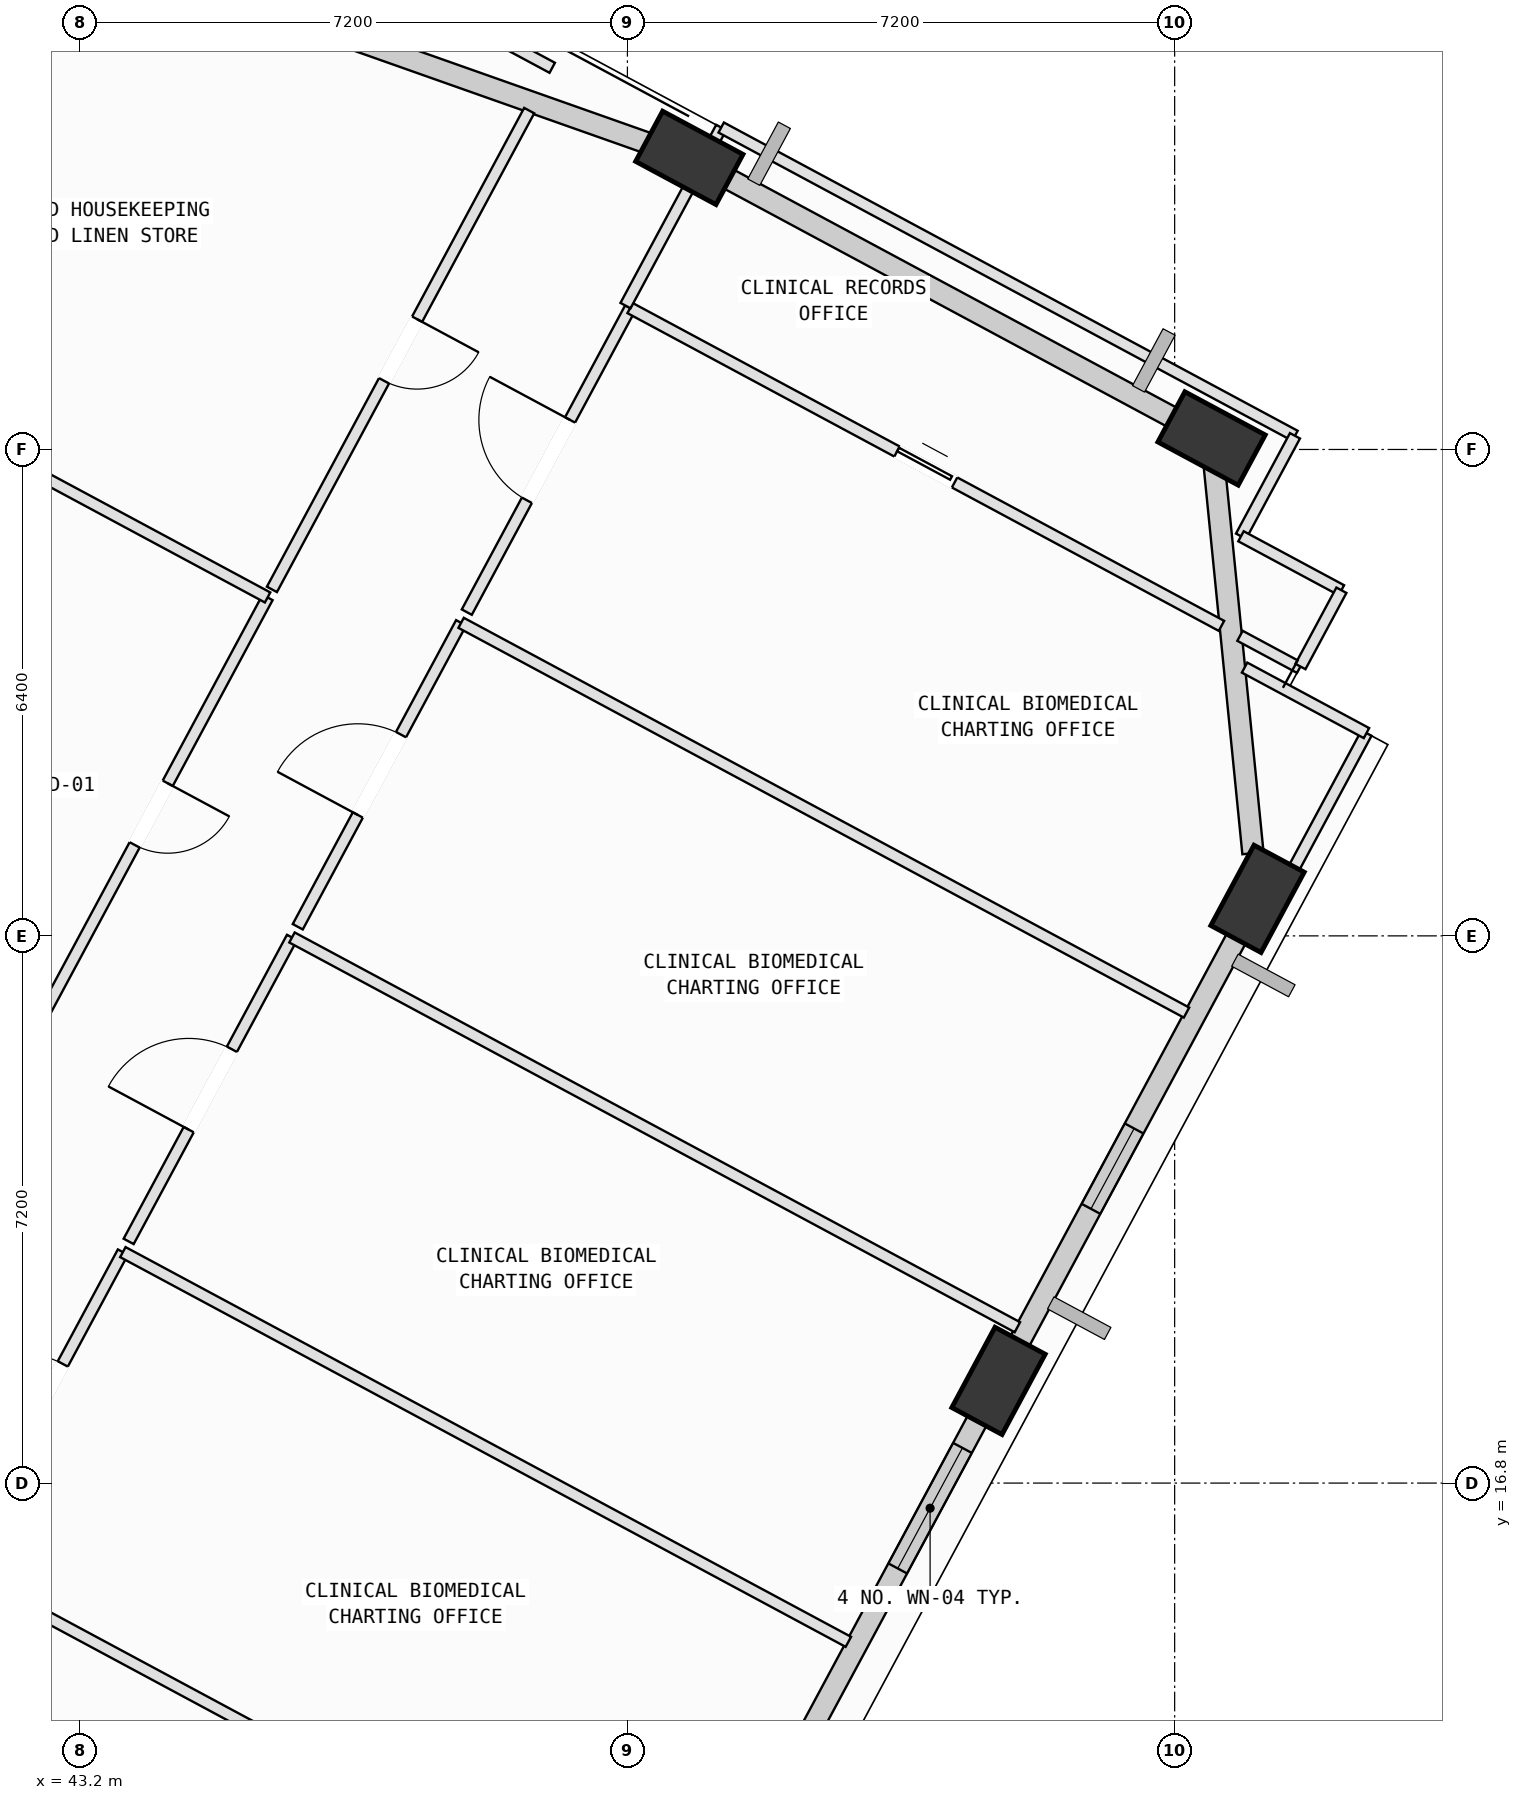
"""IFC4 building model, lengths in metres.
Left out: names, types, materials, properties, quantities, classifications, styles, units other than length and angle.
Written with IfcOpenShell. Run it as: python <this file> out.ifc"""

import sys

from ifc_helpers import new_model, si_unit, direction, frame, frame_2d, origin, origin_2d, place, context, subcontext, project, spatial, rectangle, extrude, element, fill, save


model = new_model("IFC4")
c1 = context("Model", 3, precision=1e-05, world=origin(), true_north=direction((0.0, 1.0)))
c2 = subcontext(c1, "Body", "Model", "MODEL_VIEW")
j1 = project(units=[si_unit("LENGTHUNIT", "METRE"), si_unit("PLANEANGLEUNIT", "RADIAN")], contexts=[c1])
p1 = place(None, origin())
s1 = spatial("IfcSite", under=j1, at=p1, CompositionType="ELEMENT")
p2 = place(p1, origin())
s2 = spatial("IfcBuilding", under=s1, at=p2, CompositionType="ELEMENT")
p3 = place(p2, frame((0.0, 0.0, 288.6)))
s3 = spatial("IfcBuildingStorey", under=s2, at=p3, CompositionType="ELEMENT", Elevation=288.6)
p4 = place(p3, frame((55.282, 18.145, 0.002), z_axis=(0.026701241209, 0.089713737548, 0.99560960673), x_axis=(-0.70383349377, -0.705563431999, 0.082453965787)))
e1 = element("IfcColumn", 1, at=p4, inside=s3, PredefinedType="COLUMN", context=c2, shape_type="SweptSolid", body=[
    extrude(rectangle(XDim=1.2, YDim=0.75, at=origin_2d()), origin(), (0.0, 0.0, 1.0), 4.014),
])
p5 = place(p3, frame((58.69, 24.487, 0.002), z_axis=(0.000425341829, 0.103479590753, 0.994631486221), x_axis=(-0.476917007508, -0.874208749099, 0.091154983125)))
e2 = element("IfcColumn", 2, at=p5, inside=s3, PredefinedType="COLUMN", context=c2, shape_type="SweptSolid", body=[
    extrude(rectangle(XDim=1.2, YDim=0.75, at=origin_2d()), origin(), (0.0, 0.0, 1.0), 4.018),
])
p6 = place(p3, frame((58.085, 30.545, 0.002), z_axis=(-0.024487034295, 0.100743183277, 0.994611077846), x_axis=(0.967157776152, -0.249394798072, 0.049072097195)))
e3 = element("IfcColumn", 3, at=p6, inside=s3, PredefinedType="COLUMN", context=c2, shape_type="SweptSolid", body=[
    extrude(rectangle(XDim=1.2, YDim=0.75, at=origin_2d()), origin(), (0.0, 0.0, 1.0), 4.018),
])
p7 = place(p3, frame((51.215, 34.237, 0.002), z_axis=(-0.039573663733, 0.072450245911, 0.996586617914), x_axis=(0.999201856166, 0.008297625984, 0.039074288691)))
e4 = element("IfcColumn", 4, at=p7, inside=s3, PredefinedType="COLUMN", context=c2, shape_type="SweptSolid", body=[
    extrude(rectangle(XDim=1.2, YDim=0.75, at=origin_2d()), origin(), (0.0, 0.0, 1.0), 4.01),
])
p8 = place(p3, frame((55.182, 17.958, 0.0), z_axis=(0.0, 0.0, 1.0), x_axis=(-0.47331339391, -0.880894108929, 0.0)))
e5 = element("IfcWall", 5, at=p8, inside=s3, PredefinedType="SOLIDWALL", context=c2, shape_type="SweptSolid", body=[
    extrude(rectangle(XDim=6.407, YDim=0.28, at=frame_2d((3.204, 0.0))), origin(), (0.0, 0.0, 1.0), 3.265),
])
p9 = place(p8, frame((0.79, 0.0, 0.75)))
e6 = element("IfcOpeningElement", 6, at=p9, cuts=e5, PredefinedType="OPENING", context=c2, shape_type="SweptSolid", body=[
    extrude(rectangle(XDim=1.8, YDim=2.05, at=frame_2d((0.9, 1.025))), frame((0.0, 0.15, 0.0), z_axis=(0.0, -1.0, 0.0), x_axis=(1.0, 0.0, 0.0)), (0.0, 0.0, 1.0), 0.3),
])
p10 = place(p3, frame((58.595, 24.309, 0.0), z_axis=(0.0, 0.0, 1.0), x_axis=(-0.47334203282, -0.88087872035, 0.0)))
e7 = element("IfcWall", 7, at=p10, inside=s3, PredefinedType="SOLIDWALL", context=c2, shape_type="SweptSolid", body=[
    extrude(rectangle(XDim=6.418, YDim=0.28, at=frame_2d((3.209, 0.0))), origin(), (0.0, 0.0, 1.0), 3.265),
])
p11 = place(p10, frame((3.228, 0.0, 0.75)))
e8 = element("IfcOpeningElement", 8, at=p11, cuts=e7, PredefinedType="OPENING", context=c2, shape_type="SweptSolid", body=[
    extrude(rectangle(XDim=1.2, YDim=1.75, at=frame_2d((0.6, 0.875))), frame((0.0, 0.15, 0.0), z_axis=(0.0, -1.0, 0.0), x_axis=(1.0, 0.0, 0.0)), (0.0, 0.0, 1.0), 0.3),
])
p12 = place(p3, frame((58.104, 30.356, 0.0), z_axis=(0.0, 0.0, 1.0), x_axis=(0.099334776233, -0.995054070004, 0.0)))
e9 = element("IfcWall", 9, at=p12, inside=s3, PredefinedType="SOLIDWALL", context=c2, shape_type="SweptSolid", body=[
    extrude(rectangle(XDim=5.294, YDim=0.28, at=frame_2d((2.647, 0.0))), origin(), (0.0, 0.0, 1.0), 3.265),
])
p13 = place(p3, frame((51.433, 34.119, 0.0), z_axis=(0.0, 0.0, 1.0), x_axis=(0.88088796411, -0.473324829992, 0.0)))
e10 = element("IfcWall", 10, at=p13, inside=s3, PredefinedType="SOLIDWALL", context=c2, shape_type="SweptSolid", body=[
    extrude(rectangle(XDim=7.046, YDim=0.28, at=frame_2d((3.523, 0.0))), origin(), (0.0, 0.0, 1.0), 3.265),
])
p14 = place(p3, frame((42.218, 37.415, 0.0), z_axis=(0.0, 0.0, 1.0), x_axis=(0.942871061755, -0.33315786184, 0.0)))
e11 = element("IfcWall", 11, at=p14, inside=s3, PredefinedType="SOLIDWALL", context=c2, shape_type="SweptSolid", body=[
    extrude(rectangle(XDim=9.036, YDim=0.28, at=frame_2d((4.518, 0.0))), origin(), (0.0, 0.0, 1.0), 3.265),
])
p15 = place(p3, frame((41.538, 15.699, 0.0), z_axis=(0.0, 0.0, 1.0), x_axis=(0.880861511404, -0.47337405688, 0.0)))
e12 = element("IfcWall", 12, at=p15, inside=s3, PredefinedType="PARTITIONING", context=c2, shape_type="SweptSolid", body=[
    extrude(rectangle(XDim=10.835, YDim=0.15, at=frame_2d((5.417, 0.0))), origin(), (0.0, 0.0, 1.0), 3.78),
])
p16 = place(p3, frame((41.613, 15.84, 0.0), z_axis=(0.0, 0.0, 1.0), x_axis=(0.47334923321, 0.880874851168, 0.0)))
e13 = element("IfcWall", 13, at=p16, inside=s3, PredefinedType="PARTITIONING", context=c2, shape_type="SweptSolid", body=[
    extrude(rectangle(XDim=4.54, YDim=0.15, at=frame_2d((2.27, 0.0))), origin(), (0.0, 0.0, 1.0), 3.78),
])
p17 = place(p16, frame((1.67, 0.0, 0.0)))
e14 = element("IfcOpeningElement", 14, at=p17, cuts=e13, PredefinedType="OPENING", context=c2, shape_type="SweptSolid", body=[
    extrude(rectangle(XDim=1.2, YDim=2.15, at=frame_2d((0.6, 1.075))), frame((0.0, 0.085, 0.0), z_axis=(0.0, -1.0, 0.0), x_axis=(1.0, 0.0, 0.0)), (0.0, 0.0, 1.0), 0.17),
])
p18 = place(p3, frame((43.762, 19.839, 0.0), z_axis=(0.0, 0.0, 1.0), x_axis=(0.880909888867, -0.473284024341, 0.0)))
e15 = element("IfcWall", 15, at=p18, inside=s3, PredefinedType="PARTITIONING", context=c2, shape_type="SweptSolid", body=[
    extrude(rectangle(XDim=10.835, YDim=0.15, at=frame_2d((5.417, 0.0))), origin(), (0.0, 0.0, 1.0), 3.78),
])
p19 = place(p3, frame((43.838, 19.98, 0.0), z_axis=(0.0, 0.0, 1.0), x_axis=(0.473390959729, 0.880852427622, 0.0)))
e16 = element("IfcWall", 16, at=p19, inside=s3, PredefinedType="PARTITIONING", context=c2, shape_type="SweptSolid", body=[
    extrude(rectangle(XDim=4.54, YDim=0.15, at=frame_2d((2.27, 0.0))), origin(), (0.0, 0.0, 1.0), 3.78),
])
p20 = place(p19, frame((1.67, 0.0, 0.0)))
e17 = element("IfcOpeningElement", 17, at=p20, cuts=e16, PredefinedType="OPENING", context=c2, shape_type="SweptSolid", body=[
    extrude(rectangle(XDim=1.2, YDim=2.15, at=frame_2d((0.6, 1.075))), frame((0.0, 0.085, 0.0), z_axis=(0.0, -1.0, 0.0), x_axis=(1.0, 0.0, 0.0)), (0.0, 0.0, 1.0), 0.17),
])
p21 = place(p3, frame((45.987, 23.979, 0.0), z_axis=(0.0, 0.0, 1.0), x_axis=(0.880899093264, -0.473304117336, 0.0)))
e18 = element("IfcWall", 18, at=p21, inside=s3, PredefinedType="PARTITIONING", context=c2, shape_type="SweptSolid", body=[
    extrude(rectangle(XDim=10.834, YDim=0.15, at=frame_2d((5.417, 0.0))), origin(), (0.0, 0.0, 1.0), 3.78),
])
p22 = place(p3, frame((55.759, 18.547, 0.0), z_axis=(0.0, 0.0, 1.0), x_axis=(-0.472829394427, -0.881153995489, 0.0)))
e19 = element("IfcWall", 19, at=p22, inside=s3, PredefinedType="PARTITIONING", context=c2, shape_type="SweptSolid", body=[
    extrude(rectangle(XDim=0.791, YDim=0.15, at=frame_2d((0.396, 0.0))), origin(), (0.0, 0.0, 1.0), 3.265),
])
p23 = place(p3, frame((46.063, 24.12, 0.0), z_axis=(0.0, 0.0, 1.0), x_axis=(0.473371657247, 0.88086280096, 0.0)))
e20 = element("IfcWall", 20, at=p23, inside=s3, PredefinedType="PARTITIONING", context=c2, shape_type="SweptSolid", body=[
    extrude(rectangle(XDim=4.54, YDim=0.15, at=frame_2d((2.27, 0.0))), origin(), (0.0, 0.0, 1.0), 3.78),
])
p24 = place(p23, frame((1.67, 0.0, 0.0)))
e21 = element("IfcOpeningElement", 21, at=p24, cuts=e20, PredefinedType="OPENING", context=c2, shape_type="SweptSolid", body=[
    extrude(rectangle(XDim=1.2, YDim=2.15, at=frame_2d((0.6, 1.075))), frame((0.0, 0.085, 0.0), z_axis=(0.0, -1.0, 0.0), x_axis=(1.0, 0.0, 0.0)), (0.0, 0.0, 1.0), 0.17),
])
p25 = place(p3, frame((48.212, 28.119, 0.0), z_axis=(0.0, 0.0, 1.0), x_axis=(0.880904141107, -0.473294722324, 0.0)))
e22 = element("IfcWall", 22, at=p25, inside=s3, PredefinedType="PARTITIONING", context=c2, shape_type="SweptSolid", body=[
    extrude(rectangle(XDim=10.834, YDim=0.15, at=frame_2d((5.417, 0.0))), origin(), (0.0, 0.0, 1.0), 3.78),
])
p26 = place(p3, frame((60.124, 26.668, 0.0), z_axis=(0.0, 0.0, 1.0), x_axis=(-0.473268165107, -0.88091840933, 0.0)))
e23 = element("IfcWall", 23, at=p26, inside=s3, PredefinedType="PARTITIONING", context=c2, shape_type="SweptSolid", body=[
    extrude(rectangle(XDim=2.802, YDim=0.15, at=frame_2d((1.401, 0.0))), origin(), (0.0, 0.0, 1.0), 3.265),
])
p27 = place(p3, frame((48.287, 28.26, 0.0), z_axis=(0.0, 0.0, 1.0), x_axis=(0.473259555236, 0.880923034877, 0.0)))
e24 = element("IfcWall", 24, at=p27, inside=s3, PredefinedType="PARTITIONING", context=c2, shape_type="SweptSolid", body=[
    extrude(rectangle(XDim=4.541, YDim=0.15, at=frame_2d((2.271, 0.0))), origin(), (0.0, 0.0, 1.0), 3.78),
])
p28 = place(p27, frame((1.67, 0.0, 0.0)))
e25 = element("IfcOpeningElement", 25, at=p28, cuts=e24, PredefinedType="OPENING", context=c2, shape_type="SweptSolid", body=[
    extrude(rectangle(XDim=1.2, YDim=2.15, at=frame_2d((0.6, 1.075))), frame((0.0, 0.085, 0.0), z_axis=(0.0, -1.0, 0.0), x_axis=(1.0, 0.0, 0.0)), (0.0, 0.0, 1.0), 0.17),
])
p29 = place(p3, frame((50.436, 32.26, 0.0), z_axis=(0.0, 0.0, 1.0), x_axis=(0.880864883218, -0.473367782505, 0.0)))
e26 = element("IfcWall", 26, at=p29, inside=s3, PredefinedType="PARTITIONING", context=c2, shape_type="SweptSolid", body=[
    extrude(rectangle(XDim=8.832, YDim=0.15, at=frame_2d((4.416, 0.0))), origin(), (0.0, 0.0, 1.0), 3.78),
])
p30 = place(p29, frame((3.986, 0.0, 0.0)))
e27 = element("IfcOpeningElement", 27, at=p30, cuts=e26, PredefinedType="OPENING", context=c2, shape_type="SweptSolid", body=[
    extrude(rectangle(XDim=0.86, YDim=2.06, at=frame_2d((0.43, 1.03))), frame((0.0, 0.085, 0.0), z_axis=(0.0, -1.0, 0.0), x_axis=(1.0, 0.0, 0.0)), (0.0, 0.0, 1.0), 0.17),
])
p31 = place(p3, frame((58.46, 27.948, 0.0), z_axis=(0.0, 0.0, 1.0), x_axis=(0.880778708518, -0.473528105419, 0.0)))
e28 = element("IfcWall", 28, at=p31, inside=s3, PredefinedType="PARTITIONING", context=c2, shape_type="SweptSolid", body=[
    extrude(rectangle(XDim=0.891, YDim=0.15, at=frame_2d((0.446, 0.0))), origin(), (0.0, 0.0, 1.0), 3.78),
])
p32 = place(p3, frame((58.52, 27.53, 0.0), z_axis=(0.0, 0.0, 1.0), x_axis=(0.880845362496, -0.47340410578, 0.0)))
e29 = element("IfcWall", 29, at=p32, inside=s3, PredefinedType="PARTITIONING", context=c2, shape_type="SweptSolid", body=[
    extrude(rectangle(XDim=1.821, YDim=0.15, at=frame_2d((0.911, 0.0))), origin(), (0.0, 0.0, 1.0), 3.78),
])
p33 = place(p3, frame((45.666, 28.453, 0.0), z_axis=(0.0, 0.0, 1.0), x_axis=(-0.473292007071, -0.880905599961, 0.0)))
e30 = element("IfcWall", 30, at=p33, inside=s3, PredefinedType="PARTITIONING", context=c2, shape_type="SweptSolid", body=[
    extrude(rectangle(XDim=6.472, YDim=0.15, at=frame_2d((3.236, 0.0))), origin(), (0.0, 0.0, 1.0), 3.78),
])
p34 = place(p33, frame((2.776, 0.0, 0.0)))
e31 = element("IfcOpeningElement", 31, at=p34, cuts=e30, PredefinedType="OPENING", context=c2, shape_type="SweptSolid", body=[
    extrude(rectangle(XDim=0.92, YDim=2.1, at=frame_2d((0.46, 1.05))), frame((0.0, 0.085, 0.0), z_axis=(0.0, -1.0, 0.0), x_axis=(1.0, 0.0, 0.0)), (0.0, 0.0, 1.0), 0.17),
])
p35 = place(p3, frame((39.117, 31.972, 0.0), z_axis=(0.0, 0.0, 1.0), x_axis=(0.880885157777, -0.47333005272, 0.0)))
e32 = element("IfcWall", 32, at=p35, inside=s3, PredefinedType="PARTITIONING", context=c2, shape_type="SweptSolid", body=[
    extrude(rectangle(XDim=7.435, YDim=0.15, at=frame_2d((3.717, 0.0))), origin(), (0.0, 0.0, 1.0), 3.78),
])
p36 = place(p3, frame((43.597, 38.546, 0.0), z_axis=(0.0, 0.0, 1.0), x_axis=(0.880901900683, -0.473298892216, 0.0)))
e33 = element("IfcWall", 33, at=p36, inside=s3, PredefinedType="PARTITIONING", context=c2, shape_type="SweptSolid", body=[
    extrude(rectangle(XDim=6.6, YDim=0.15, at=frame_2d((3.3, 0.0))), origin(), (0.0, 0.0, 1.0), 3.265),
])
p37 = place(p3, frame((49.108, 34.859, 0.0), z_axis=(0.0, 0.0, 1.0), x_axis=(-0.473319949653, -0.88089058643, 0.0)))
e34 = element("IfcWall", 34, at=p37, inside=s3, PredefinedType="PARTITIONING", context=c2, shape_type="SweptSolid", body=[
    extrude(rectangle(XDim=7.152, YDim=0.15, at=frame_2d((3.576, 0.0))), origin(), (0.0, 0.0, 1.0), 3.78),
])
p38 = place(p37, frame((3.116, 0.0, 0.0)))
e35 = element("IfcOpeningElement", 35, at=p38, cuts=e34, PredefinedType="OPENING", context=c2, shape_type="SweptSolid", body=[
    extrude(rectangle(XDim=0.92, YDim=2.1, at=frame_2d((0.46, 1.05))), frame((0.0, 0.085, 0.0), z_axis=(0.0, -1.0, 0.0), x_axis=(1.0, 0.0, 0.0)), (0.0, 0.0, 1.0), 0.17),
])
p39 = place(p3, frame((50.375, 32.293, 0.0), z_axis=(0.0, 0.0, 1.0), x_axis=(0.47339968985, 0.880847735792, 0.0)))
e36 = element("IfcWall", 36, at=p39, inside=s3, PredefinedType="PARTITIONING", context=c2, shape_type="SweptSolid", body=[
    extrude(rectangle(XDim=2.018, YDim=0.15, at=frame_2d((1.009, 0.0))), origin(), (0.0, 0.0, 1.0), 3.78),
])
p40 = place(p3, frame((51.417, 34.233, 0.0), z_axis=(0.0, 0.0, 1.0), x_axis=(0.474099823035, 0.880471099922, 0.0)))
e37 = element("IfcWall", 37, at=p40, inside=s3, PredefinedType="PARTITIONING", context=c2, shape_type="SweptSolid", body=[
    extrude(rectangle(XDim=0.458, YDim=0.15, at=frame_2d((0.229, 0.0))), origin(), (0.0, 0.0, 1.0), 3.78),
])
p41 = place(p3, frame((51.634, 34.636, 0.0), z_axis=(0.0, 0.0, 1.0), x_axis=(0.880907992192, -0.473287554551, 0.0)))
e38 = element("IfcWall", 38, at=p41, inside=s3, PredefinedType="PARTITIONING", context=c2, shape_type="SweptSolid", body=[
    extrude(rectangle(XDim=8.57, YDim=0.15, at=frame_2d((4.285, 0.0))), origin(), (0.0, 0.0, 1.0), 3.265),
])
p42 = place(p3, frame((59.183, 30.58, 0.0), z_axis=(0.0, 0.0, 1.0), x_axis=(-0.473245885676, -0.880930378458, 0.0)))
e39 = element("IfcWall", 39, at=p42, inside=s3, PredefinedType="PARTITIONING", context=c2, shape_type="SweptSolid", body=[
    extrude(rectangle(XDim=1.501, YDim=0.15, at=frame_2d((0.75, 0.0))), origin(), (0.0, 0.0, 1.0), 3.78),
])
p43 = place(p3, frame((58.473, 29.258, 0.0), z_axis=(0.0, 0.0, 1.0), x_axis=(0.880852398613, -0.473391013707, 0.0)))
e40 = element("IfcWall", 40, at=p43, inside=s3, PredefinedType="PARTITIONING", context=c2, shape_type="SweptSolid", body=[
    extrude(rectangle(XDim=1.5, YDim=0.15, at=frame_2d((0.75, 0.0))), origin(), (0.0, 0.0, 1.0), 3.78),
])
p44 = place(p3, frame((59.794, 28.548, 0.0), z_axis=(0.0, 0.0, 1.0), x_axis=(-0.472988079019, -0.881068826543, 0.0)))
e41 = element("IfcWall", 41, at=p44, inside=s3, PredefinedType="PARTITIONING", context=c2, shape_type="SweptSolid", body=[
    extrude(rectangle(XDim=1.14, YDim=0.15, at=frame_2d((0.57, 0.0))), origin(), (0.0, 0.0, 1.0), 3.78),
])
p45 = place(p9, origin())
e42 = element("IfcWindow", 42, at=p45, inside=s3, PartitioningType="SINGLE_PANEL", PredefinedType="WINDOW", context=c2, shape_type="SweptSolid", body=[
    extrude(rectangle(XDim=1.8, YDim=2.05, at=frame_2d((0.9, 1.025))), frame((0.0, 0.03, 0.0), z_axis=(0.0, -1.0, 0.0), x_axis=(1.0, 0.0, 0.0)), (0.0, 0.0, 1.0), 0.06),
])
fill(e6, e42)
p46 = place(p11, origin())
e43 = element("IfcWindow", 43, at=p46, inside=s3, PartitioningType="SINGLE_PANEL", PredefinedType="WINDOW", context=c2, shape_type="SweptSolid", body=[
    extrude(rectangle(XDim=1.2, YDim=1.75, at=frame_2d((0.6, 0.875))), frame((0.0, 0.03, 0.0), z_axis=(0.0, -1.0, 0.0), x_axis=(1.0, 0.0, 0.0)), (0.0, 0.0, 1.0), 0.06),
])
fill(e8, e43)
p47 = place(p17, origin())
e44 = element("IfcDoor", 44, at=p47, inside=s3, OperationType="SINGLE_SWING_LEFT", PredefinedType="DOOR", context=c2, shape_type="SweptSolid", body=[
    extrude(rectangle(XDim=1.2, YDim=2.15, at=frame_2d((0.6, 1.075))), frame((0.0, 0.025, 0.0), z_axis=(0.0, -1.0, 0.0), x_axis=(1.0, 0.0, 0.0)), (0.0, 0.0, 1.0), 0.05),
])
fill(e14, e44)
p48 = place(p20, origin())
e45 = element("IfcDoor", 45, at=p48, inside=s3, OperationType="SINGLE_SWING_LEFT", PredefinedType="DOOR", context=c2, shape_type="SweptSolid", body=[
    extrude(rectangle(XDim=1.2, YDim=2.15, at=frame_2d((0.6, 1.075))), frame((0.0, 0.025, 0.0), z_axis=(0.0, -1.0, 0.0), x_axis=(1.0, 0.0, 0.0)), (0.0, 0.0, 1.0), 0.05),
])
fill(e17, e45)
p49 = place(p24, origin())
e46 = element("IfcDoor", 46, at=p49, inside=s3, OperationType="SINGLE_SWING_LEFT", PredefinedType="DOOR", context=c2, shape_type="SweptSolid", body=[
    extrude(rectangle(XDim=1.2, YDim=2.15, at=frame_2d((0.6, 1.075))), frame((0.0, 0.025, 0.0), z_axis=(0.0, -1.0, 0.0), x_axis=(1.0, 0.0, 0.0)), (0.0, 0.0, 1.0), 0.05),
])
fill(e21, e46)
p50 = place(p28, origin())
e47 = element("IfcDoor", 47, at=p50, inside=s3, OperationType="SINGLE_SWING_RIGHT", PredefinedType="DOOR", context=c2, shape_type="SweptSolid", body=[
    extrude(rectangle(XDim=1.2, YDim=2.15, at=frame_2d((0.6, 1.075))), frame((0.0, 0.025, 0.0), z_axis=(0.0, -1.0, 0.0), x_axis=(1.0, 0.0, 0.0)), (0.0, 0.0, 1.0), 0.05),
])
fill(e25, e47)
p51 = place(p34, origin())
e48 = element("IfcDoor", 48, at=p51, inside=s3, OperationType="SINGLE_SWING_LEFT", PredefinedType="DOOR", context=c2, shape_type="SweptSolid", body=[
    extrude(rectangle(XDim=0.92, YDim=2.1, at=frame_2d((0.46, 1.05))), frame((0.0, 0.025, 0.0), z_axis=(0.0, -1.0, 0.0), x_axis=(1.0, 0.0, 0.0)), (0.0, 0.0, 1.0), 0.05),
])
fill(e31, e48)
p52 = place(p38, origin())
e49 = element("IfcDoor", 49, at=p52, inside=s3, OperationType="SINGLE_SWING_LEFT", PredefinedType="DOOR", context=c2, shape_type="SweptSolid", body=[
    extrude(rectangle(XDim=0.92, YDim=2.1, at=frame_2d((0.46, 1.05))), frame((0.0, 0.025, 0.0), z_axis=(0.0, -1.0, 0.0), x_axis=(1.0, 0.0, 0.0)), (0.0, 0.0, 1.0), 0.05),
])
fill(e35, e49)
p53 = place(p30, origin())
e50 = element("IfcDoor", 50, at=p53, inside=s3, OperationType="SLIDING_TO_LEFT", PredefinedType="DOOR", context=c2, shape_type="SweptSolid", body=[
    extrude(rectangle(XDim=0.86, YDim=2.06, at=frame_2d((0.43, 1.03))), frame((0.0, 0.025, 0.0), z_axis=(0.0, -1.0, 0.0), x_axis=(1.0, 0.0, 0.0)), (0.0, 0.0, 1.0), 0.05),
])
fill(e27, e50)
save(model, sys.argv[1])
